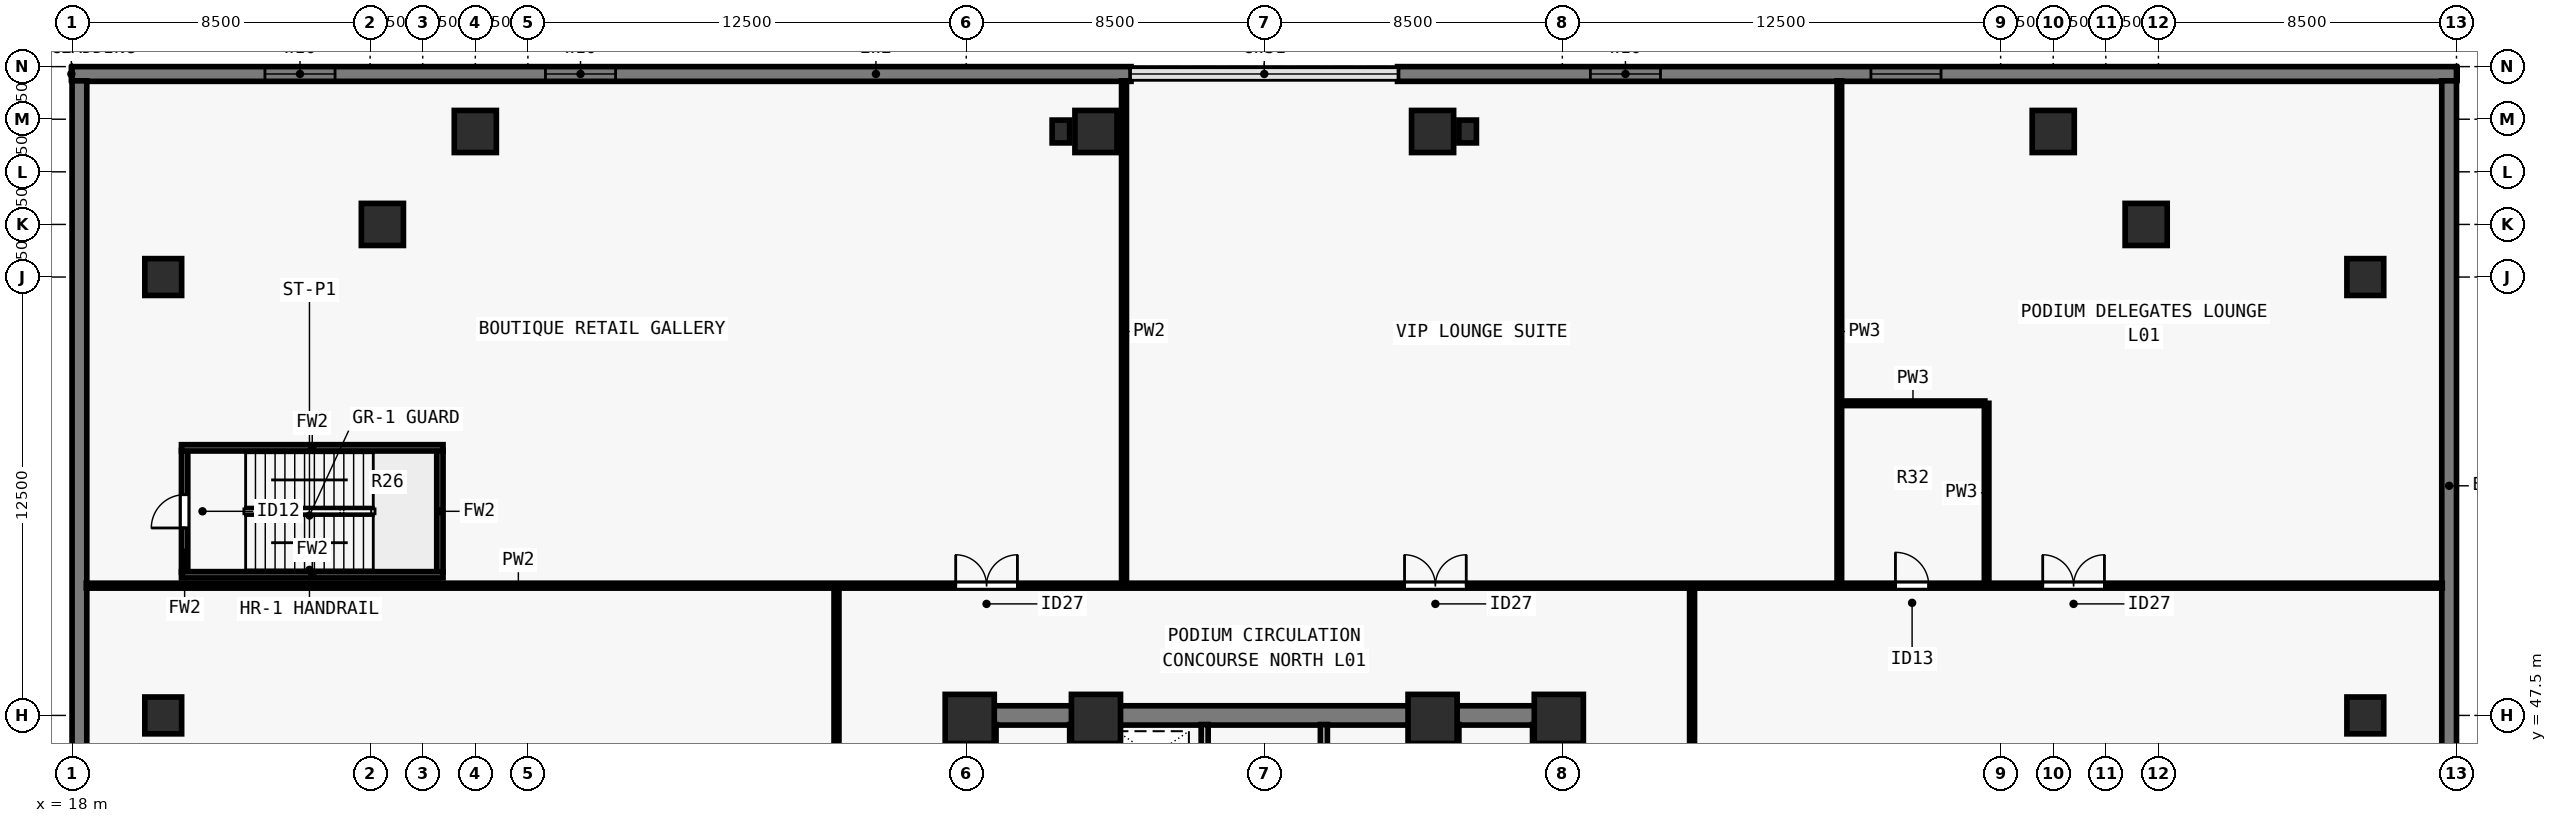
"""IFC4 building model, lengths in metres.
Left out: names, types, materials, properties, quantities, classifications, styles, units other than length and angle.
Written with IfcOpenShell. Run it as: python <this file> out.ifc"""

import sys

from ifc_helpers import new_model, si_unit, direction, frame, frame_2d, origin, origin_2d, place, context, subcontext, project, spatial, rectangle, extrude, element, fill, save


model = new_model("IFC4")
c1 = context("Model", 3, precision=1e-05, world=origin(), true_north=direction((0.0, 1.0)))
c2 = subcontext(c1, "Body", "Model", "MODEL_VIEW")
j1 = project(units=[si_unit("LENGTHUNIT", "METRE"), si_unit("PLANEANGLEUNIT", "RADIAN")], contexts=[c1])
p1 = place(None, origin())
s1 = spatial("IfcSite", under=j1, at=p1, CompositionType="ELEMENT")
p2 = place(p1, origin())
s2 = spatial("IfcBuilding", under=s1, at=p2, CompositionType="ELEMENT")
p3 = place(p2, frame((0.0, 0.0, 5.0)))
s3 = spatial("IfcBuildingStorey", under=s2, at=p3, CompositionType="ELEMENT", Elevation=5.0)
for number, where, z_axis, x_axis in (
    (1, (43.6, 47.4, 0.0), (0.0, 0.0, 1.0), (1.0, 0.0, 0.0)),
    (2, (47.2, 47.4, 0.0), (0.0, 0.0, 1.0), (1.0, 0.0, 0.0)),
    (3, (56.8, 47.4, 0.0), (0.0, 0.0, 1.0), (1.0, 0.0, 0.0)),
    (4, (60.4, 47.4, 0.0), (0.0, 0.0, 1.0), (1.0, 0.0, 0.0)),
):
    element("IfcColumn", number, at=place(p3, frame(where, z_axis=z_axis, x_axis=x_axis)), inside=s3, PredefinedType="COLUMN", context=c2, shape_type="SweptSolid", body=[
        extrude(rectangle(XDim=1.4, YDim=1.4, at=origin_2d()), origin(), (0.0, 0.0, 1.0), 5.0),
    ])
for number, where, z_axis, x_axis in (
    (5, (77.15, 61.5, 0.0), (0.0, 0.0, 1.0), (1.0, 0.0, 0.0)),
    (6, (74.5, 64.15, 0.0), (0.0, 0.0, 1.0), (1.0, 0.0, 0.0)),
    (7, (56.8, 64.15, 0.0), (0.0, 0.0, 1.0), (1.0, 0.0, 0.0)),
    (8, (47.2, 64.15, 0.0), (0.0, 0.0, 1.0), (1.0, 0.0, 0.0)),
    (9, (29.5, 64.15, 0.0), (0.0, 0.0, 1.0), (1.0, 0.0, 0.0)),
    (10, (26.85, 61.5, 0.0), (0.0, 0.0, 1.0), (1.0, 0.0, 0.0)),
):
    element("IfcColumn", number, at=place(p3, frame(where, z_axis=z_axis, x_axis=x_axis)), inside=s3, PredefinedType="COLUMN", context=c2, shape_type="SweptSolid", body=[
        extrude(rectangle(XDim=1.2, YDim=1.2, at=origin_2d()), origin(), (0.0, 0.0, 1.0), 5.0),
    ])
for number, where, z_axis, x_axis in (
    (11, (46.2, 64.15, 0.0), (0.0, 0.0, 1.0), (1.0, 0.0, 0.0)),
    (12, (57.8, 64.15, 0.0), (0.0, 0.0, 1.0), (1.0, 0.0, 0.0)),
):
    element("IfcColumn", number, at=place(p3, frame(where, z_axis=z_axis, x_axis=x_axis)), inside=s3, PredefinedType="PILASTER", context=c2, shape_type="SweptSolid", body=[
        extrude(rectangle(XDim=0.5, YDim=0.65, at=origin_2d()), origin(), (0.0, 0.0, 1.0), 5.0),
    ])
for number, where, z_axis, x_axis in (
    (13, (20.6, 47.5, 0.0), (0.0, 0.0, 1.0), (1.0, 0.0, 0.0)),
    (14, (20.6, 60.0, 0.0), (0.0, 0.0, 1.0), (1.0, 0.0, 0.0)),
    (15, (83.4, 47.5, 0.0), (0.0, 0.0, 1.0), (1.0, 0.0, 0.0)),
    (16, (83.4, 60.0, 0.0), (0.0, 0.0, 1.0), (1.0, 0.0, 0.0)),
):
    element("IfcColumn", number, at=place(p3, frame(where, z_axis=z_axis, x_axis=x_axis)), inside=s3, PredefinedType="COLUMN", context=c2, shape_type="SweptSolid", body=[
        extrude(rectangle(XDim=1.05, YDim=1.05, at=origin_2d()), origin(), (0.0, 0.0, 1.0), 5.0),
    ])
p4 = place(p3, frame((18.0, 65.79, 0.0), z_axis=(0.0, 0.0, 1.0), x_axis=(1.0, 0.0, 0.0)))
e17 = element("IfcWall", 17, at=p4, inside=s3, PredefinedType="SOLIDWALL", context=c2, shape_type="SweptSolid", body=[
    extrude(rectangle(XDim=30.2, YDim=0.42, at=frame_2d((15.1, 0.0))), origin(), (0.0, 0.0, 1.0), 4.72),
])
p5 = place(p4, frame((5.5, 0.0, 0.8)))
e18 = element("IfcOpeningElement", 18, at=p5, cuts=e17, PredefinedType="OPENING", context=c2, shape_type="SweptSolid", body=[
    extrude(rectangle(XDim=2.0, YDim=2.4, at=frame_2d((1.0, 1.2))), frame((0.0, 0.22, 0.0), z_axis=(0.0, -1.0, 0.0), x_axis=(1.0, 0.0, 0.0)), (0.0, 0.0, 1.0), 0.44),
])
p6 = place(p4, frame((13.5, 0.0, 0.8)))
e19 = element("IfcOpeningElement", 19, at=p6, cuts=e17, PredefinedType="OPENING", context=c2, shape_type="SweptSolid", body=[
    extrude(rectangle(XDim=2.0, YDim=2.4, at=frame_2d((1.0, 1.2))), frame((0.0, 0.22, 0.0), z_axis=(0.0, -1.0, 0.0), x_axis=(1.0, 0.0, 0.0)), (0.0, 0.0, 1.0), 0.44),
])
p7 = place(p3, frame((55.8, 65.79, 0.0), z_axis=(0.0, 0.0, 1.0), x_axis=(1.0, 0.0, 0.0)))
e20 = element("IfcWall", 20, at=p7, inside=s3, PredefinedType="SOLIDWALL", context=c2, shape_type="SweptSolid", body=[
    extrude(rectangle(XDim=30.2, YDim=0.42, at=frame_2d((15.1, 0.0))), origin(), (0.0, 0.0, 1.0), 4.72),
])
p8 = place(p7, frame((5.5, 0.0, 0.8)))
e21 = element("IfcOpeningElement", 21, at=p8, cuts=e20, PredefinedType="OPENING", context=c2, shape_type="SweptSolid", body=[
    extrude(rectangle(XDim=2.0, YDim=2.4, at=frame_2d((1.0, 1.2))), frame((0.0, 0.22, 0.0), z_axis=(0.0, -1.0, 0.0), x_axis=(1.0, 0.0, 0.0)), (0.0, 0.0, 1.0), 0.44),
])
p9 = place(p7, frame((13.5, 0.0, 0.8)))
e22 = element("IfcOpeningElement", 22, at=p9, cuts=e20, PredefinedType="OPENING", context=c2, shape_type="SweptSolid", body=[
    extrude(rectangle(XDim=2.0, YDim=2.4, at=frame_2d((1.0, 1.2))), frame((0.0, 0.22, 0.0), z_axis=(0.0, -1.0, 0.0), x_axis=(1.0, 0.0, 0.0)), (0.0, 0.0, 1.0), 0.44),
])
for number, where, z_axis, x_axis in (
    (23, (85.79, 65.595, 0.0), (0.0, 0.0, 1.0), (0.0, -1.0, 0.0)),
    (24, (18.21, 42.5, 0.0), (0.0, 0.0, 1.0), (0.0, 1.0, 0.0)),
):
    element("IfcWall", number, at=place(p3, frame(where, z_axis=z_axis, x_axis=x_axis)), inside=s3, PredefinedType="SOLIDWALL", context=c2, shape_type="SweptSolid", body=[
        extrude(rectangle(XDim=23.095, YDim=0.42, at=frame_2d((11.547, 0.0))), origin(), (0.0, 0.0, 1.0), 4.72),
    ])
p10 = place(p3, frame((43.225, 47.5, 0.0), z_axis=(0.0, 0.0, 1.0), x_axis=(1.0, 0.0, 0.0)))
e25 = element("IfcWall", 25, at=p10, inside=s3, PredefinedType="SHEAR", context=c2, shape_type="SweptSolid", body=[
    extrude(rectangle(XDim=17.55, YDim=0.55, at=frame_2d((8.775, 0.0))), origin(), (0.0, 0.0, 1.0), 4.72),
])
for number, where, z_axis, x_axis in (
    (26, (43.5, 40.8, 0.0), (0.0, 0.0, 1.0), (0.0, 1.0, 0.0)),
    (27, (60.5, 40.8, 0.0), (0.0, 0.0, 1.0), (0.0, 1.0, 0.0)),
):
    element("IfcWall", number, at=place(p3, frame(where, z_axis=z_axis, x_axis=x_axis)), inside=s3, PredefinedType="SHEAR", context=c2, shape_type="SweptSolid", body=[
        extrude(rectangle(XDim=6.435, YDim=0.55, at=frame_2d((3.218, 0.0))), origin(), (0.0, 0.0, 1.0), 4.72),
    ])
p11 = place(p3, frame((50.3, 40.585, 0.0), z_axis=(0.0, 0.0, 1.0), x_axis=(0.0, 1.0, 0.0)))
e28 = element("IfcWall", 28, at=p11, inside=s3, PredefinedType="SOLIDWALL", context=c2, shape_type="SweptSolid", body=[
    extrude(rectangle(XDim=6.655, YDim=0.2, at=frame_2d((3.328, 0.0))), origin(), (0.0, 0.0, 1.0), 4.72),
])
p12 = place(p11, frame((5.065, 0.0, 0.0)))
e29 = element("IfcOpeningElement", 29, at=p12, cuts=e28, PredefinedType="OPENING", context=c2, shape_type="SweptSolid", body=[
    extrude(rectangle(XDim=0.8, YDim=2.08, at=frame_2d((0.4, 1.04))), frame((0.0, 0.11, 0.0), z_axis=(0.0, -1.0, 0.0), x_axis=(1.0, 0.0, 0.0)), (0.0, 0.0, 1.0), 0.22),
])
p13 = place(p3, frame((53.7, 40.585, 0.0), z_axis=(0.0, 0.0, 1.0), x_axis=(0.0, 1.0, 0.0)))
e30 = element("IfcWall", 30, at=p13, inside=s3, PredefinedType="SOLIDWALL", context=c2, shape_type="SweptSolid", body=[
    extrude(rectangle(XDim=6.655, YDim=0.2, at=frame_2d((3.328, 0.0))), origin(), (0.0, 0.0, 1.0), 4.72),
])
p14 = place(p13, frame((0.195, 0.0, 0.0)))
e31 = element("IfcOpeningElement", 31, at=p14, cuts=e30, PredefinedType="OPENING", context=c2, shape_type="SweptSolid", body=[
    extrude(rectangle(XDim=0.8, YDim=2.08, at=frame_2d((0.4, 1.04))), frame((0.0, 0.11, 0.0), z_axis=(0.0, -1.0, 0.0), x_axis=(1.0, 0.0, 0.0)), (0.0, 0.0, 1.0), 0.22),
])
p15 = place(p13, frame((4.265, 0.0, 0.0)))
e32 = element("IfcOpeningElement", 32, at=p15, cuts=e30, PredefinedType="OPENING", context=c2, shape_type="SweptSolid", body=[
    extrude(rectangle(XDim=0.95, YDim=2.12, at=frame_2d((0.475, 1.06))), frame((0.0, 0.11, 0.0), z_axis=(0.0, -1.0, 0.0), x_axis=(1.0, 0.0, 0.0)), (0.0, 0.0, 1.0), 0.22),
])
for number, where, z_axis, x_axis in (
    (33, (46.55, 43.735, 0.0), (0.0, 0.0, 1.0), (0.0, 1.0, 0.0)),
    (34, (44.25, 43.735, 0.0), (0.0, 0.0, 1.0), (0.0, 1.0, 0.0)),
    (35, (57.45, 43.735, 0.0), (0.0, 0.0, 1.0), (0.0, 1.0, 0.0)),
    (36, (59.75, 43.735, 0.0), (0.0, 0.0, 1.0), (0.0, 1.0, 0.0)),
):
    element("IfcWall", number, at=place(p3, frame(where, z_axis=z_axis, x_axis=x_axis)), inside=s3, PredefinedType="SOLIDWALL", context=c2, shape_type="SweptSolid", body=[
        extrude(rectangle(XDim=3.505, YDim=0.2, at=frame_2d((1.752, 0.0))), origin(), (0.0, 0.0, 1.0), 4.72),
    ])
for number, where, z_axis, x_axis in (
    (37, (47.35, 43.735, 0.0), (0.0, 0.0, 1.0), (0.0, 1.0, 0.0)),
    (38, (56.65, 43.735, 0.0), (0.0, 0.0, 1.0), (0.0, 1.0, 0.0)),
):
    element("IfcWall", number, at=place(p3, frame(where, z_axis=z_axis, x_axis=x_axis)), inside=s3, PredefinedType="SOLIDWALL", context=c2, shape_type="SweptSolid", body=[
        extrude(rectangle(XDim=3.505, YDim=0.18, at=frame_2d((1.752, 0.0))), origin(), (0.0, 0.0, 1.0), 4.72),
    ])
p16 = place(p3, frame((18.405, 51.2, 0.0), z_axis=(0.0, 0.0, 1.0), x_axis=(1.0, 0.0, 0.0)))
e39 = element("IfcWall", 39, at=p16, inside=s3, PredefinedType="PARTITIONING", context=c2, shape_type="SweptSolid", body=[
    extrude(rectangle(XDim=67.19, YDim=0.14, at=frame_2d((33.595, 0.0))), origin(), (0.0, 0.0, 1.0), 4.238),
])
p17 = place(p16, frame((24.795, 0.0, 0.0)))
e40 = element("IfcOpeningElement", 40, at=p17, cuts=e39, PredefinedType="OPENING", context=c2, shape_type="SweptSolid", body=[
    extrude(rectangle(XDim=1.76, YDim=2.2, at=frame_2d((0.88, 1.1))), frame((0.0, 0.08, 0.0), z_axis=(0.0, -1.0, 0.0), x_axis=(1.0, 0.0, 0.0)), (0.0, 0.0, 1.0), 0.16),
])
p18 = place(p16, frame((37.595, 0.0, 0.0)))
e41 = element("IfcOpeningElement", 41, at=p18, cuts=e39, PredefinedType="OPENING", context=c2, shape_type="SweptSolid", body=[
    extrude(rectangle(XDim=1.76, YDim=2.2, at=frame_2d((0.88, 1.1))), frame((0.0, 0.08, 0.0), z_axis=(0.0, -1.0, 0.0), x_axis=(1.0, 0.0, 0.0)), (0.0, 0.0, 1.0), 0.16),
])
p19 = place(p16, frame((51.595, 0.0, 0.0)))
e42 = element("IfcOpeningElement", 42, at=p19, cuts=e39, PredefinedType="OPENING", context=c2, shape_type="SweptSolid", body=[
    extrude(rectangle(XDim=0.95, YDim=2.1, at=frame_2d((0.475, 1.05))), frame((0.0, 0.08, 0.0), z_axis=(0.0, -1.0, 0.0), x_axis=(1.0, 0.0, 0.0)), (0.0, 0.0, 1.0), 0.16),
])
p20 = place(p16, frame((55.795, 0.0, 0.0)))
e43 = element("IfcOpeningElement", 43, at=p20, cuts=e39, PredefinedType="OPENING", context=c2, shape_type="SweptSolid", body=[
    extrude(rectangle(XDim=1.76, YDim=2.2, at=frame_2d((0.88, 1.1))), frame((0.0, 0.08, 0.0), z_axis=(0.0, -1.0, 0.0), x_axis=(1.0, 0.0, 0.0)), (0.0, 0.0, 1.0), 0.16),
])
p21 = place(p3, frame((39.8, 26.855, 0.0), z_axis=(0.0, 0.0, 1.0), x_axis=(0.0, 1.0, 0.0)))
e44 = element("IfcWall", 44, at=p21, inside=s3, PredefinedType="PARTITIONING", context=c2, shape_type="SweptSolid", body=[
    extrude(rectangle(XDim=24.29, YDim=0.14, at=frame_2d((12.145, 0.0))), origin(), (0.0, 0.0, 1.0), 4.72),
])
p22 = place(p21, frame((10.945, 0.0, 0.0)))
e45 = element("IfcOpeningElement", 45, at=p22, cuts=e44, PredefinedType="OPENING", context=c2, shape_type="SweptSolid", body=[
    extrude(rectangle(XDim=1.76, YDim=2.2, at=frame_2d((0.88, 1.1))), frame((0.0, 0.08, 0.0), z_axis=(0.0, -1.0, 0.0), x_axis=(1.0, 0.0, 0.0)), (0.0, 0.0, 1.0), 0.16),
])
p23 = place(p3, frame((64.2, 26.855, 0.0), z_axis=(0.0, 0.0, 1.0), x_axis=(0.0, 1.0, 0.0)))
e46 = element("IfcWall", 46, at=p23, inside=s3, PredefinedType="PARTITIONING", context=c2, shape_type="SweptSolid", body=[
    extrude(rectangle(XDim=24.29, YDim=0.14, at=frame_2d((12.145, 0.0))), origin(), (0.0, 0.0, 1.0), 4.72),
])
p24 = place(p23, frame((10.945, 0.0, 0.0)))
e47 = element("IfcOpeningElement", 47, at=p24, cuts=e46, PredefinedType="OPENING", context=c2, shape_type="SweptSolid", body=[
    extrude(rectangle(XDim=1.76, YDim=2.2, at=frame_2d((0.88, 1.1))), frame((0.0, 0.08, 0.0), z_axis=(0.0, -1.0, 0.0), x_axis=(1.0, 0.0, 0.0)), (0.0, 0.0, 1.0), 0.16),
])
p25 = place(p3, frame((48.0, 51.3, 0.0), z_axis=(0.0, 0.0, 1.0), x_axis=(0.0, 1.0, 0.0)))
e48 = element("IfcWall", 48, at=p25, inside=s3, PredefinedType="PARTITIONING", context=c2, shape_type="SweptSolid", body=[
    extrude(rectangle(XDim=14.295, YDim=0.14, at=frame_2d((7.147, 0.0))), origin(), (0.0, 0.0, 1.0), 4.72),
])
p26 = place(p3, frame((68.4, 51.3, 0.0), z_axis=(0.0, 0.0, 1.0), x_axis=(0.0, 1.0, 0.0)))
e49 = element("IfcWall", 49, at=p26, inside=s3, PredefinedType="PLUMBINGWALL", context=c2, shape_type="SweptSolid", body=[
    extrude(rectangle(XDim=14.295, YDim=0.13, at=frame_2d((7.147, 0.0))), origin(), (0.0, 0.0, 1.0), 3.771),
])
p27 = place(p3, frame((72.6, 51.3, 0.0), z_axis=(0.0, 0.0, 1.0), x_axis=(0.0, 1.0, 0.0)))
e50 = element("IfcWall", 50, at=p27, inside=s3, PredefinedType="PLUMBINGWALL", context=c2, shape_type="SweptSolid", body=[
    extrude(rectangle(XDim=5.1, YDim=0.13, at=frame_2d((2.55, 0.0))), origin(), (0.0, 0.0, 1.0), 4.72),
])
p28 = place(p3, frame((68.45, 56.4, 0.0), z_axis=(0.0, 0.0, 1.0), x_axis=(1.0, 0.0, 0.0)))
e51 = element("IfcWall", 51, at=p28, inside=s3, PredefinedType="PLUMBINGWALL", context=c2, shape_type="SweptSolid", body=[
    extrude(rectangle(XDim=4.1, YDim=0.13, at=frame_2d((2.05, 0.0))), origin(), (0.0, 0.0, 1.0), 4.238),
])
p29 = place(p3, frame((21.21, 51.585, 0.0), z_axis=(0.0, 0.0, 1.0), x_axis=(0.0, 1.0, 0.0)))
e52 = element("IfcWall", 52, at=p29, inside=s3, PredefinedType="SOLIDWALL", context=c2, shape_type="SweptSolid", body=[
    extrude(rectangle(XDim=3.47, YDim=0.18, at=frame_2d((1.735, 0.0))), origin(), (0.0, 0.0, 1.0), 4.72),
])
p30 = place(p29, frame((1.26, 0.0, 0.0)))
e53 = element("IfcOpeningElement", 53, at=p30, cuts=e52, PredefinedType="OPENING", context=c2, shape_type="SweptSolid", body=[
    extrude(rectangle(XDim=0.95, YDim=2.15, at=frame_2d((0.475, 1.075))), frame((0.0, 0.1, 0.0), z_axis=(0.0, -1.0, 0.0), x_axis=(1.0, 0.0, 0.0)), (0.0, 0.0, 1.0), 0.2),
])
p31 = place(p3, frame((28.49, 51.585, 0.0), z_axis=(0.0, 0.0, 1.0), x_axis=(0.0, 1.0, 0.0)))
e54 = element("IfcWall", 54, at=p31, inside=s3, PredefinedType="SOLIDWALL", context=c2, shape_type="SweptSolid", body=[
    extrude(rectangle(XDim=3.47, YDim=0.18, at=frame_2d((1.735, 0.0))), origin(), (0.0, 0.0, 1.0), 4.72),
])
for number, where, z_axis, x_axis in (
    (55, (21.12, 51.51, 0.0), (0.0, 0.0, 1.0), (1.0, 0.0, 0.0)),
    (56, (21.12, 55.13, 0.0), (0.0, 0.0, 1.0), (1.0, 0.0, 0.0)),
):
    element("IfcWall", number, at=place(p3, frame(where, z_axis=z_axis, x_axis=x_axis)), inside=s3, PredefinedType="SOLIDWALL", context=c2, shape_type="SweptSolid", body=[
        extrude(rectangle(XDim=7.46, YDim=0.18, at=frame_2d((3.73, 0.0))), origin(), (0.0, 0.0, 1.0), 4.72),
    ])
p32 = place(p5, origin())
e57 = element("IfcWindow", 57, at=p32, inside=s3, PartitioningType="SINGLE_PANEL", PredefinedType="WINDOW", context=c2, shape_type="SweptSolid", body=[
    extrude(rectangle(XDim=2.0, YDim=2.4, at=frame_2d((1.0, 1.2))), frame((0.0, -0.05, 0.0), z_axis=(0.0, -1.0, 0.0), x_axis=(1.0, 0.0, 0.0)), (0.0, 0.0, 1.0), 0.06),
])
fill(e18, e57)
p33 = place(p6, origin())
e58 = element("IfcWindow", 58, at=p33, inside=s3, PartitioningType="SINGLE_PANEL", PredefinedType="WINDOW", context=c2, shape_type="SweptSolid", body=[
    extrude(rectangle(XDim=2.0, YDim=2.4, at=frame_2d((1.0, 1.2))), frame((0.0, -0.05, 0.0), z_axis=(0.0, -1.0, 0.0), x_axis=(1.0, 0.0, 0.0)), (0.0, 0.0, 1.0), 0.06),
])
fill(e19, e58)
p34 = place(p8, origin())
e59 = element("IfcWindow", 59, at=p34, inside=s3, PartitioningType="SINGLE_PANEL", PredefinedType="WINDOW", context=c2, shape_type="SweptSolid", body=[
    extrude(rectangle(XDim=2.0, YDim=2.4, at=frame_2d((1.0, 1.2))), frame((0.0, -0.05, 0.0), z_axis=(0.0, -1.0, 0.0), x_axis=(1.0, 0.0, 0.0)), (0.0, 0.0, 1.0), 0.06),
])
fill(e21, e59)
p35 = place(p9, origin())
e60 = element("IfcWindow", 60, at=p35, inside=s3, PartitioningType="SINGLE_PANEL", PredefinedType="WINDOW", context=c2, shape_type="SweptSolid", body=[
    extrude(rectangle(XDim=2.0, YDim=2.4, at=frame_2d((1.0, 1.2))), frame((0.0, -0.05, 0.0), z_axis=(0.0, -1.0, 0.0), x_axis=(1.0, 0.0, 0.0)), (0.0, 0.0, 1.0), 0.06),
])
fill(e22, e60)
p36 = place(p17, origin())
e61 = element("IfcDoor", 61, at=p36, inside=s3, OperationType="DOUBLE_DOOR_SINGLE_SWING", PredefinedType="DOOR", context=c2, shape_type="SweptSolid", body=[
    extrude(rectangle(XDim=1.76, YDim=2.2, at=frame_2d((0.88, 1.1))), frame((0.0, 0.025, 0.0), z_axis=(0.0, -1.0, 0.0), x_axis=(1.0, 0.0, 0.0)), (0.0, 0.0, 1.0), 0.05),
])
fill(e40, e61)
p37 = place(p18, origin())
e62 = element("IfcDoor", 62, at=p37, inside=s3, OperationType="DOUBLE_DOOR_SINGLE_SWING", PredefinedType="DOOR", context=c2, shape_type="SweptSolid", body=[
    extrude(rectangle(XDim=1.76, YDim=2.2, at=frame_2d((0.88, 1.1))), frame((0.0, 0.025, 0.0), z_axis=(0.0, -1.0, 0.0), x_axis=(1.0, 0.0, 0.0)), (0.0, 0.0, 1.0), 0.05),
])
fill(e41, e62)
p38 = place(p19, origin())
e63 = element("IfcDoor", 63, at=p38, inside=s3, OperationType="SINGLE_SWING_LEFT", PredefinedType="DOOR", context=c2, shape_type="SweptSolid", body=[
    extrude(rectangle(XDim=0.95, YDim=2.1, at=frame_2d((0.475, 1.05))), frame((0.0, 0.025, 0.0), z_axis=(0.0, -1.0, 0.0), x_axis=(1.0, 0.0, 0.0)), (0.0, 0.0, 1.0), 0.05),
])
fill(e42, e63)
p39 = place(p20, origin())
e64 = element("IfcDoor", 64, at=p39, inside=s3, OperationType="DOUBLE_DOOR_SINGLE_SWING", PredefinedType="DOOR", context=c2, shape_type="SweptSolid", body=[
    extrude(rectangle(XDim=1.76, YDim=2.2, at=frame_2d((0.88, 1.1))), frame((0.0, 0.025, 0.0), z_axis=(0.0, -1.0, 0.0), x_axis=(1.0, 0.0, 0.0)), (0.0, 0.0, 1.0), 0.05),
])
fill(e43, e64)
p40 = place(p30, origin())
e65 = element("IfcDoor", 65, at=p40, inside=s3, OperationType="SINGLE_SWING_LEFT", PredefinedType="DOOR", context=c2, shape_type="SweptSolid", body=[
    extrude(rectangle(XDim=0.95, YDim=2.15, at=frame_2d((0.475, 1.075))), frame((0.0, 0.025, 0.0), z_axis=(0.0, -1.0, 0.0), x_axis=(1.0, 0.0, 0.0)), (0.0, 0.0, 1.0), 0.05),
])
fill(e53, e65)
save(model, sys.argv[1])
